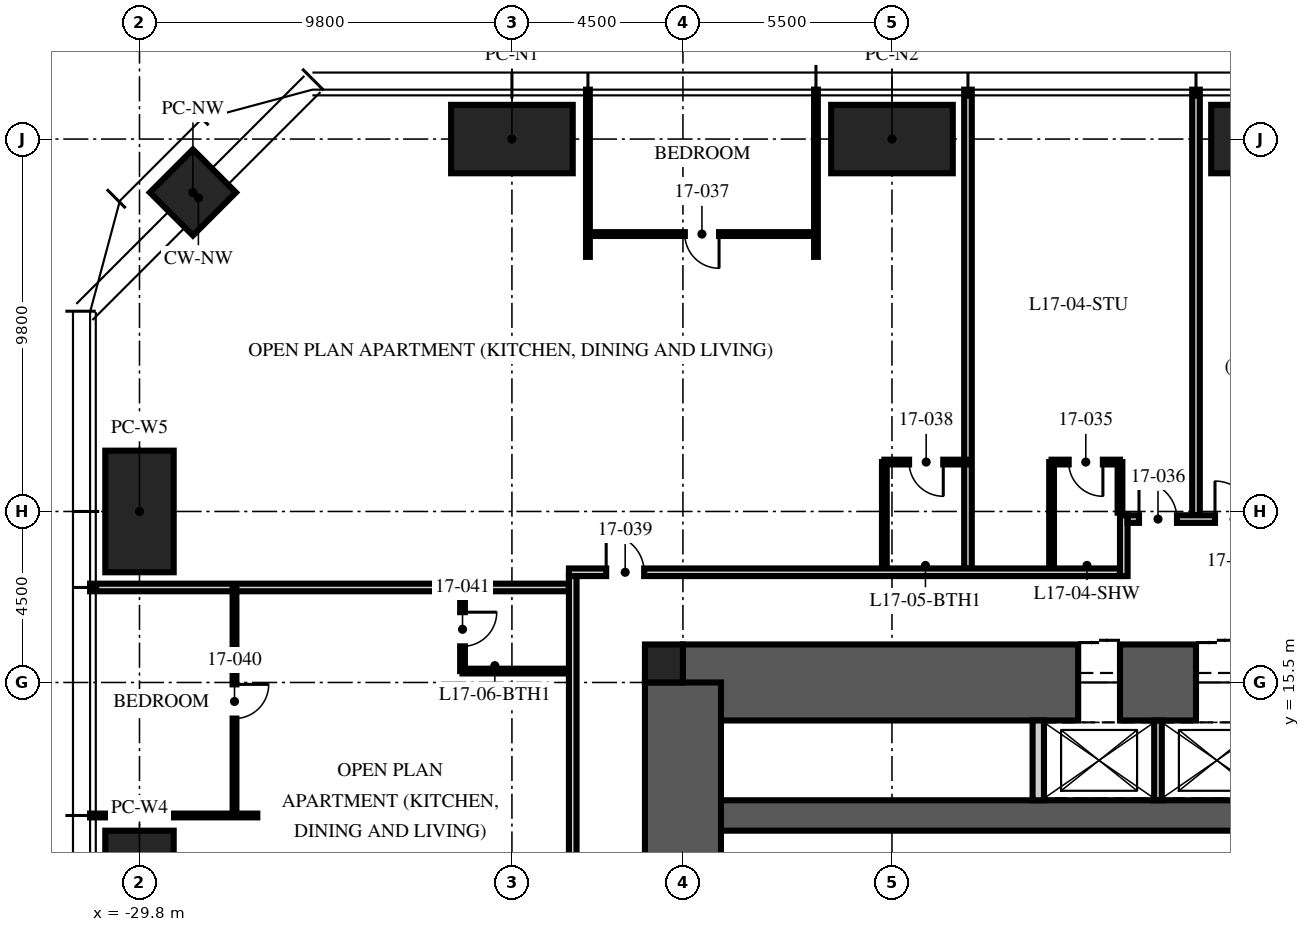
"""IFC4 building model, lengths in metres.
Left out: names, types, materials, properties, quantities, classifications, styles, units other than length and angle.
Written with IfcOpenShell. Run it as: python <this file> out.ifc"""

import sys

from ifc_helpers import new_model, si_unit, direction, frame, frame_2d, origin, origin_2d, place, context, subcontext, project, spatial, rectangle, hollow_rectangle, extrude, element, fill, save


model = new_model("IFC4")
c1 = context("Model", 3, precision=1e-05, world=origin(), true_north=direction((0.0, 1.0)))
c2 = subcontext(c1, "Body", "Model", "MODEL_VIEW")
j1 = project(units=[si_unit("LENGTHUNIT", "METRE"), si_unit("PLANEANGLEUNIT", "RADIAN")], contexts=[c1])
p1 = place(None, origin())
s1 = spatial("IfcSite", under=j1, at=p1, CompositionType="ELEMENT")
p2 = place(p1, origin())
s2 = spatial("IfcBuilding", under=s1, at=p2, CompositionType="ELEMENT")
p3 = place(p2, frame((0.0, 0.0, 69.75)))
s3 = spatial("IfcBuildingStorey", under=s2, at=p3, CompositionType="ELEMENT", Elevation=69.75)
p4 = place(p3, frame((-15.5, 15.5, -0.25), z_axis=(0.0, 0.0, 1.0), x_axis=(1.0, 0.0, 0.0)))
e1 = element("IfcWall", 1, at=p4, inside=s3, PredefinedType="SHEAR", context=c2, shape_type="SweptSolid", body=[
    extrude(rectangle(XDim=31.0, YDim=2.0, at=frame_2d((15.5, 0.0))), origin(), (0.0, 0.0, 1.0), 3.75),
])
p5 = place(p4, frame((10.4, 0.0, 0.25)))
e2 = element("IfcOpeningElement", 2, at=p5, cuts=e1, PredefinedType="OPENING", context=c2, shape_type="SweptSolid", body=[
    extrude(rectangle(XDim=1.1, YDim=2.1, at=frame_2d((0.55, 1.05))), frame((0.0, 1.01, 0.0), z_axis=(0.0, -1.0, 0.0), x_axis=(1.0, 0.0, 0.0)), (0.0, 0.0, 1.0), 2.02),
])
p6 = place(p4, frame((13.5, 0.0, 0.25)))
e3 = element("IfcOpeningElement", 3, at=p6, cuts=e1, PredefinedType="OPENING", context=c2, shape_type="SweptSolid", body=[
    extrude(rectangle(XDim=1.1, YDim=2.1, at=frame_2d((0.55, 1.05))), frame((0.0, 1.01, 0.0), z_axis=(0.0, -1.0, 0.0), x_axis=(1.0, 0.0, 0.0)), (0.0, 0.0, 1.0), 2.02),
])
p7 = place(p4, frame((16.6, 0.0, 0.25)))
e4 = element("IfcOpeningElement", 4, at=p7, cuts=e1, PredefinedType="OPENING", context=c2, shape_type="SweptSolid", body=[
    extrude(rectangle(XDim=1.1, YDim=2.1, at=frame_2d((0.55, 1.05))), frame((0.0, 1.01, 0.0), z_axis=(0.0, -1.0, 0.0), x_axis=(1.0, 0.0, 0.0)), (0.0, 0.0, 1.0), 2.02),
])
p8 = place(p3, frame((-15.5, 12.0, -0.25), z_axis=(0.0, 0.0, 1.0), x_axis=(1.0, 0.0, 0.0)))
e5 = element("IfcWall", 5, at=p8, inside=s3, PredefinedType="SHEAR", context=c2, shape_type="SweptSolid", body=[
    extrude(rectangle(XDim=31.0, YDim=0.8, at=frame_2d((15.5, 0.0))), origin(), (0.0, 0.0, 1.0), 3.75),
])
p9 = place(p3, frame((-15.5, -15.5, -0.25), z_axis=(0.0, 0.0, 1.0), x_axis=(0.0, 1.0, 0.0)))
e6 = element("IfcWall", 6, at=p9, inside=s3, PredefinedType="SHEAR", context=c2, shape_type="SweptSolid", body=[
    extrude(rectangle(XDim=31.0, YDim=2.0, at=frame_2d((15.5, 0.0))), origin(), (0.0, 0.0, 1.0), 3.75),
])
p10 = place(p9, frame((6.5, 0.0, 0.25)))
e7 = element("IfcOpeningElement", 7, at=p10, cuts=e6, PredefinedType="OPENING", context=c2, shape_type="SweptSolid", body=[
    extrude(rectangle(XDim=1.2, YDim=2.1, at=frame_2d((0.6, 1.05))), frame((0.0, 1.01, 0.0), z_axis=(0.0, -1.0, 0.0), x_axis=(1.0, 0.0, 0.0)), (0.0, 0.0, 1.0), 2.02),
])
p11 = place(p9, frame((23.0, 0.0, 0.25)))
e8 = element("IfcOpeningElement", 8, at=p11, cuts=e6, PredefinedType="OPENING", context=c2, shape_type="SweptSolid", body=[
    extrude(rectangle(XDim=1.8, YDim=2.1, at=frame_2d((0.9, 1.05))), frame((0.0, 1.01, 0.0), z_axis=(0.0, -1.0, 0.0), x_axis=(1.0, 0.0, 0.0)), (0.0, 0.0, 1.0), 2.02),
])
p12 = place(p3, frame((-16.0, 16.0, -0.25), z_axis=(0.0, 0.0, 1.0), x_axis=(1.0, 0.0, 0.0)))
e9 = element("IfcColumn", 9, at=p12, inside=s3, PredefinedType="COLUMN", context=c2, shape_type="SweptSolid", body=[
    extrude(rectangle(XDim=1.0, YDim=1.0, at=origin_2d()), origin(), (0.0, 0.0, 1.0), 3.75),
])
for number, where, z_axis, x_axis in (
    (10, (-20.0, 29.8, 0.0), (0.0, 0.0, 1.0), (1.0, 0.0, 0.0)),
    (11, (-10.0, 29.8, 0.0), (0.0, 0.0, 1.0), (1.0, 0.0, 0.0)),
    (12, (0.0, 29.8, 0.0), (0.0, 0.0, 1.0), (1.0, 0.0, 0.0)),
    (13, (-29.8, 10.0, 0.0), (0.0, 0.0, 1.0), (0.0, 1.0, 0.0)),
    (14, (-29.8, 20.0, 0.0), (0.0, 0.0, 1.0), (0.0, 1.0, 0.0)),
):
    element("IfcColumn", number, at=place(p3, frame(where, z_axis=z_axis, x_axis=x_axis)), inside=s3, PredefinedType="COLUMN", context=c2, shape_type="SweptSolid", body=[
        extrude(hollow_rectangle(XDim=3.2, YDim=1.8, WallThickness=0.2, at=origin_2d()), origin(), (0.0, 0.0, 1.0), 3.75),
    ])
p13 = place(p3, frame((-28.394, 28.394, 0.0), z_axis=(0.0, 0.0, 1.0), x_axis=(0.707106781187, 0.707106781187, 0.0)))
e15 = element("IfcColumn", 15, at=p13, inside=s3, PredefinedType="COLUMN", context=c2, shape_type="SweptSolid", body=[
    extrude(hollow_rectangle(XDim=1.6, YDim=1.6, WallThickness=0.1, at=origin_2d()), origin(), (0.0, 0.0, 1.0), 3.75),
])
p14 = place(p3, frame((-6.15, 12.4, 0.0), z_axis=(0.0, 0.0, 1.0), x_axis=(0.0, 1.0, 0.0)))
e16 = element("IfcWall", 16, at=p14, inside=s3, PredefinedType="PARTITIONING", context=c2, shape_type="SweptSolid", body=[
    extrude(rectangle(XDim=2.1, YDim=0.3, at=frame_2d((1.05, 0.0))), origin(), (0.0, 0.0, 1.0), 3.5),
])
p15 = place(p3, frame((-3.0, 12.4, 0.0), z_axis=(0.0, 0.0, 1.0), x_axis=(0.0, 1.0, 0.0)))
e17 = element("IfcWall", 17, at=p15, inside=s3, PredefinedType="PARTITIONING", context=c2, shape_type="SweptSolid", body=[
    extrude(rectangle(XDim=2.1, YDim=0.2, at=frame_2d((1.05, 0.0))), origin(), (0.0, 0.0, 1.0), 3.5),
])
p16 = place(p3, frame((-2.0, 19.9, 0.0), z_axis=(0.0, 0.0, 1.0), x_axis=(0.0, 1.0, 0.0)))
e18 = element("IfcWall", 18, at=p16, inside=s3, PredefinedType="PARTITIONING", context=c2, shape_type="SweptSolid", body=[
    extrude(rectangle(XDim=11.2, YDim=0.2, at=frame_2d((5.6, 0.0))), origin(), (0.0, 0.0, 1.0), 2.71),
])
p17 = place(p3, frame((-8.0, 18.5, 0.0), z_axis=(0.0, 0.0, 1.0), x_axis=(0.0, 1.0, 0.0)))
e19 = element("IfcWall", 19, at=p17, inside=s3, PredefinedType="PARTITIONING", context=c2, shape_type="SweptSolid", body=[
    extrude(rectangle(XDim=12.6, YDim=0.2, at=frame_2d((6.3, 0.0))), origin(), (0.0, 0.0, 1.0), 2.71),
])
for number, where, z_axis, x_axis in (
    (20, (-12.0, 26.7, 0.0), (0.0, 0.0, 1.0), (0.0, 1.0, 0.0)),
    (21, (-18.0, 26.7, 0.0), (0.0, 0.0, 1.0), (0.0, 1.0, 0.0)),
):
    element("IfcWall", number, at=place(p3, frame(where, z_axis=z_axis, x_axis=x_axis)), inside=s3, PredefinedType="PARTITIONING", context=c2, shape_type="SweptSolid", body=[
        extrude(rectangle(XDim=4.4, YDim=0.1, at=frame_2d((2.2, 0.0))), origin(), (0.0, 0.0, 1.0), 2.71),
    ])
p18 = place(p3, frame((-18.5, 18.0, 0.0), z_axis=(0.0, 0.0, 1.0), x_axis=(-1.0, 0.0, 0.0)))
e22 = element("IfcWall", 22, at=p18, inside=s3, PredefinedType="PARTITIONING", context=c2, shape_type="SweptSolid", body=[
    extrude(rectangle(XDim=12.6, YDim=0.2, at=frame_2d((6.3, 0.0))), origin(), (0.0, 0.0, 1.0), 2.3),
])
p19 = place(p3, frame((-26.7, 12.0, 0.0), z_axis=(0.0, 0.0, 1.0), x_axis=(-1.0, 0.0, 0.0)))
e23 = element("IfcWall", 23, at=p19, inside=s3, PredefinedType="PARTITIONING", context=c2, shape_type="SweptSolid", body=[
    extrude(rectangle(XDim=4.4, YDim=0.1, at=frame_2d((2.2, 0.0))), origin(), (0.0, 0.0, 1.0), 2.71),
])
p20 = place(p3, frame((-4.0, 21.3, 0.0), z_axis=(0.0, 0.0, 1.0), x_axis=(-1.0, 0.0, 0.0)))
e24 = element("IfcWall", 24, at=p20, inside=s3, PredefinedType="PARTITIONING", context=c2, shape_type="SweptSolid", body=[
    extrude(rectangle(XDim=1.8, YDim=0.125, at=frame_2d((0.9, 0.0))), origin(), (0.0, 0.0, 1.0), 2.61),
])
p21 = place(p20, frame((0.45, 0.0, 0.0)))
e25 = element("IfcOpeningElement", 25, at=p21, cuts=e24, PredefinedType="OPENING", context=c2, shape_type="SweptSolid", body=[
    extrude(rectangle(XDim=0.9, YDim=2.1, at=frame_2d((0.45, 1.05))), frame((0.0, 0.073, 0.0), z_axis=(0.0, -1.0, 0.0), x_axis=(1.0, 0.0, 0.0)), (0.0, 0.0, 1.0), 0.145),
])
p22 = place(p3, frame((-4.0, 19.97, 0.0), z_axis=(0.0, 0.0, 1.0), x_axis=(0.0, 1.0, 0.0)))
e26 = element("IfcWall", 26, at=p22, inside=s3, PredefinedType="PARTITIONING", context=c2, shape_type="SweptSolid", body=[
    extrude(rectangle(XDim=1.33, YDim=0.125, at=frame_2d((0.665, 0.0))), origin(), (0.0, 0.0, 1.0), 3.5),
])
p23 = place(p3, frame((-5.8, 18.5, 0.0), z_axis=(0.0, 0.0, 1.0), x_axis=(0.0, 1.0, 0.0)))
e27 = element("IfcWall", 27, at=p23, inside=s3, PredefinedType="PARTITIONING", context=c2, shape_type="SweptSolid", body=[
    extrude(rectangle(XDim=2.8, YDim=0.125, at=frame_2d((1.4, 0.0))), origin(), (0.0, 0.0, 1.0), 3.5),
])
p24 = place(p3, frame((-12.0, 27.3, 0.0), z_axis=(0.0, 0.0, 1.0), x_axis=(-1.0, 0.0, 0.0)))
e28 = element("IfcWall", 28, at=p24, inside=s3, PredefinedType="PARTITIONING", context=c2, shape_type="SweptSolid", body=[
    extrude(rectangle(XDim=6.0, YDim=0.1, at=frame_2d((3.0, 0.0))), origin(), (0.0, 0.0, 1.0), 2.61),
])
p25 = place(p24, frame((2.55, 0.0, 0.0)))
e29 = element("IfcOpeningElement", 29, at=p25, cuts=e28, PredefinedType="OPENING", context=c2, shape_type="SweptSolid", body=[
    extrude(rectangle(XDim=0.9, YDim=2.1, at=frame_2d((0.45, 1.05))), frame((0.0, 0.06, 0.0), z_axis=(0.0, -1.0, 0.0), x_axis=(1.0, 0.0, 0.0)), (0.0, 0.0, 1.0), 0.12),
])
p26 = place(p3, frame((-8.0, 21.3, 0.0), z_axis=(0.0, 0.0, 1.0), x_axis=(-1.0, 0.0, 0.0)))
e30 = element("IfcWall", 30, at=p26, inside=s3, PredefinedType="PARTITIONING", context=c2, shape_type="SweptSolid", body=[
    extrude(rectangle(XDim=2.2, YDim=0.125, at=frame_2d((1.1, 0.0))), origin(), (0.0, 0.0, 1.0), 2.492),
])
p27 = place(p26, frame((0.65, 0.0, 0.0)))
e31 = element("IfcOpeningElement", 31, at=p27, cuts=e30, PredefinedType="OPENING", context=c2, shape_type="SweptSolid", body=[
    extrude(rectangle(XDim=0.9, YDim=2.1, at=frame_2d((0.45, 1.05))), frame((0.0, 0.073, 0.0), z_axis=(0.0, -1.0, 0.0), x_axis=(1.0, 0.0, 0.0)), (0.0, 0.0, 1.0), 0.145),
])
p28 = place(p3, frame((-10.2, 18.5, 0.0), z_axis=(0.0, 0.0, 1.0), x_axis=(0.0, 1.0, 0.0)))
e32 = element("IfcWall", 32, at=p28, inside=s3, PredefinedType="PARTITIONING", context=c2, shape_type="SweptSolid", body=[
    extrude(rectangle(XDim=2.8, YDim=0.125, at=frame_2d((1.4, 0.0))), origin(), (0.0, 0.0, 1.0), 2.492),
])
p29 = place(p3, frame((-27.3, 18.0, 0.0), z_axis=(0.0, 0.0, 1.0), x_axis=(0.0, -1.0, 0.0)))
e33 = element("IfcWall", 33, at=p29, inside=s3, PredefinedType="PARTITIONING", context=c2, shape_type="SweptSolid", body=[
    extrude(rectangle(XDim=6.0, YDim=0.1, at=frame_2d((3.0, 0.0))), origin(), (0.0, 0.0, 1.0), 2.61),
])
p30 = place(p29, frame((2.55, 0.0, 0.0)))
e34 = element("IfcOpeningElement", 34, at=p30, cuts=e33, PredefinedType="OPENING", context=c2, shape_type="SweptSolid", body=[
    extrude(rectangle(XDim=0.9, YDim=2.1, at=frame_2d((0.45, 1.05))), frame((0.0, 0.06, 0.0), z_axis=(0.0, -1.0, 0.0), x_axis=(1.0, 0.0, 0.0)), (0.0, 0.0, 1.0), 0.12),
])
p31 = place(p3, frame((-21.3, 18.0, 0.0), z_axis=(0.0, 0.0, 1.0), x_axis=(0.0, -1.0, 0.0)))
e35 = element("IfcWall", 35, at=p31, inside=s3, PredefinedType="PARTITIONING", context=c2, shape_type="SweptSolid", body=[
    extrude(rectangle(XDim=2.2, YDim=0.125, at=frame_2d((1.1, 0.0))), origin(), (0.0, 0.0, 1.0), 3.5),
])
p32 = place(p31, frame((0.65, 0.0, 0.0)))
e36 = element("IfcOpeningElement", 36, at=p32, cuts=e35, PredefinedType="OPENING", context=c2, shape_type="SweptSolid", body=[
    extrude(rectangle(XDim=0.9, YDim=2.1, at=frame_2d((0.45, 1.05))), frame((0.0, 0.073, 0.0), z_axis=(0.0, -1.0, 0.0), x_axis=(1.0, 0.0, 0.0)), (0.0, 0.0, 1.0), 0.145),
])
p33 = place(p3, frame((-18.5, 15.8, 0.0), z_axis=(0.0, 0.0, 1.0), x_axis=(-1.0, 0.0, 0.0)))
e37 = element("IfcWall", 37, at=p33, inside=s3, PredefinedType="PARTITIONING", context=c2, shape_type="SweptSolid", body=[
    extrude(rectangle(XDim=2.8, YDim=0.125, at=frame_2d((1.4, 0.0))), origin(), (0.0, 0.0, 1.0), 3.5),
])
p34 = place(p3, frame((-18.5, 18.4, 0.0), z_axis=(0.0, 0.0, 1.0), x_axis=(1.0, 0.0, 0.0)))
e38 = element("IfcWall", 38, at=p34, inside=s3, PredefinedType="PARTITIONING", context=c2, shape_type="SweptSolid", body=[
    extrude(rectangle(XDim=14.5, YDim=0.2, at=frame_2d((7.25, 0.0))), origin(), (0.0, 0.0, 1.0), 2.3),
])
p35 = place(p34, frame((0.98, 0.0, 0.0)))
e39 = element("IfcOpeningElement", 39, at=p35, cuts=e38, PredefinedType="OPENING", context=c2, shape_type="SweptSolid", body=[
    extrude(rectangle(XDim=1.0, YDim=2.2, at=frame_2d((0.5, 1.1))), frame((0.0, 0.11, 0.0), z_axis=(0.0, -1.0, 0.0), x_axis=(1.0, 0.0, 0.0)), (0.0, 0.0, 1.0), 0.22),
])
p36 = place(p3, frame((-3.9, 18.3, 0.0), z_axis=(0.0, 0.0, 1.0), x_axis=(0.0, 1.0, 0.0)))
e40 = element("IfcWall", 40, at=p36, inside=s3, PredefinedType="PARTITIONING", context=c2, shape_type="SweptSolid", body=[
    extrude(rectangle(XDim=1.6, YDim=0.2, at=frame_2d((0.8, 0.0))), origin(), (0.0, 0.0, 1.0), 3.5),
])
p37 = place(p3, frame((-3.8, 19.8, 0.0), z_axis=(0.0, 0.0, 1.0), x_axis=(1.0, 0.0, 0.0)))
e41 = element("IfcWall", 41, at=p37, inside=s3, PredefinedType="PARTITIONING", context=c2, shape_type="SweptSolid", body=[
    extrude(rectangle(XDim=3.6, YDim=0.2, at=frame_2d((1.8, 0.0))), origin(), (0.0, 0.0, 1.0), 3.5),
])
p38 = place(p37, frame((2.3, 0.0, 0.0)))
e42 = element("IfcOpeningElement", 42, at=p38, cuts=e41, PredefinedType="OPENING", context=c2, shape_type="SweptSolid", body=[
    extrude(rectangle(XDim=1.0, YDim=2.2, at=frame_2d((0.5, 1.1))), frame((0.0, 0.11, 0.0), z_axis=(0.0, -1.0, 0.0), x_axis=(1.0, 0.0, 0.0)), (0.0, 0.0, 1.0), 0.22),
])
p39 = place(p37, frame((0.3, 0.0, 0.0)))
e43 = element("IfcOpeningElement", 43, at=p39, cuts=e41, PredefinedType="OPENING", context=c2, shape_type="SweptSolid", body=[
    extrude(rectangle(XDim=1.0, YDim=2.2, at=frame_2d((0.5, 1.1))), frame((0.0, 0.11, 0.0), z_axis=(0.0, -1.0, 0.0), x_axis=(1.0, 0.0, 0.0)), (0.0, 0.0, 1.0), 0.22),
])
p40 = place(p3, frame((-18.4, 18.3, 0.0), z_axis=(0.0, 0.0, 1.0), x_axis=(0.0, -1.0, 0.0)))
e44 = element("IfcWall", 44, at=p40, inside=s3, PredefinedType="PARTITIONING", context=c2, shape_type="SweptSolid", body=[
    extrude(rectangle(XDim=36.6, YDim=0.2, at=frame_2d((18.3, 0.0))), origin(), (0.0, 0.0, 1.0), 2.3),
])
p41 = place(p40, frame((8.57, 0.0, 0.0)))
e45 = element("IfcOpeningElement", 45, at=p41, cuts=e44, PredefinedType="OPENING", context=c2, shape_type="SweptSolid", body=[
    extrude(rectangle(XDim=1.0, YDim=2.2, at=frame_2d((0.5, 1.1))), frame((0.0, 0.11, 0.0), z_axis=(0.0, -1.0, 0.0), x_axis=(1.0, 0.0, 0.0)), (0.0, 0.0, 1.0), 0.22),
])
p42 = place(p40, frame((14.87, 0.0, 0.0)))
e46 = element("IfcOpeningElement", 46, at=p42, cuts=e44, PredefinedType="OPENING", context=c2, shape_type="SweptSolid", body=[
    extrude(rectangle(XDim=1.0, YDim=2.2, at=frame_2d((0.5, 1.1))), frame((0.0, 0.11, 0.0), z_axis=(0.0, -1.0, 0.0), x_axis=(1.0, 0.0, 0.0)), (0.0, 0.0, 1.0), 0.22),
])
p43 = place(p40, frame((18.87, 0.0, 0.0)))
e47 = element("IfcOpeningElement", 47, at=p43, cuts=e44, PredefinedType="OPENING", context=c2, shape_type="SweptSolid", body=[
    extrude(rectangle(XDim=1.0, YDim=2.2, at=frame_2d((0.5, 1.1))), frame((0.0, 0.11, 0.0), z_axis=(0.0, -1.0, 0.0), x_axis=(1.0, 0.0, 0.0)), (0.0, 0.0, 1.0), 0.22),
])
p44 = place(p40, frame((34.82, 0.0, 0.0)))
e48 = element("IfcOpeningElement", 48, at=p44, cuts=e44, PredefinedType="OPENING", context=c2, shape_type="SweptSolid", body=[
    extrude(rectangle(XDim=1.0, YDim=2.2, at=frame_2d((0.5, 1.1))), frame((0.0, 0.11, 0.0), z_axis=(0.0, -1.0, 0.0), x_axis=(1.0, 0.0, 0.0)), (0.0, 0.0, 1.0), 0.22),
])
p45 = place(p5, origin())
e49 = element("IfcDoor", 49, at=p45, inside=s3, OperationType="DOUBLE_DOOR_SLIDING", PredefinedType="DOOR", context=c2, shape_type="SweptSolid", body=[
    extrude(rectangle(XDim=1.1, YDim=2.1, at=frame_2d((0.55, 1.05))), frame((0.0, 0.025, 0.0), z_axis=(0.0, -1.0, 0.0), x_axis=(1.0, 0.0, 0.0)), (0.0, 0.0, 1.0), 0.05),
])
fill(e2, e49)
p46 = place(p6, origin())
e50 = element("IfcDoor", 50, at=p46, inside=s3, OperationType="DOUBLE_DOOR_SLIDING", PredefinedType="DOOR", context=c2, shape_type="SweptSolid", body=[
    extrude(rectangle(XDim=1.1, YDim=2.1, at=frame_2d((0.55, 1.05))), frame((0.0, 0.025, 0.0), z_axis=(0.0, -1.0, 0.0), x_axis=(1.0, 0.0, 0.0)), (0.0, 0.0, 1.0), 0.05),
])
fill(e3, e50)
p47 = place(p38, origin())
e51 = element("IfcDoor", 51, at=p47, inside=s3, OperationType="SINGLE_SWING_LEFT", PredefinedType="DOOR", context=c2, shape_type="SweptSolid", body=[
    extrude(rectangle(XDim=1.0, YDim=2.2, at=frame_2d((0.5, 1.1))), frame((0.0, 0.025, 0.0), z_axis=(0.0, -1.0, 0.0), x_axis=(1.0, 0.0, 0.0)), (0.0, 0.0, 1.0), 0.05),
])
fill(e42, e51)
p48 = place(p21, origin())
e52 = element("IfcDoor", 52, at=p48, inside=s3, OperationType="SINGLE_SWING_LEFT", PredefinedType="DOOR", context=c2, shape_type="SweptSolid", body=[
    extrude(rectangle(XDim=0.9, YDim=2.1, at=frame_2d((0.45, 1.05))), frame((0.0, 0.025, 0.0), z_axis=(0.0, -1.0, 0.0), x_axis=(1.0, 0.0, 0.0)), (0.0, 0.0, 1.0), 0.05),
])
fill(e25, e52)
p49 = place(p39, origin())
e53 = element("IfcDoor", 53, at=p49, inside=s3, OperationType="SINGLE_SWING_LEFT", PredefinedType="DOOR", context=c2, shape_type="SweptSolid", body=[
    extrude(rectangle(XDim=1.0, YDim=2.2, at=frame_2d((0.5, 1.1))), frame((0.0, 0.025, 0.0), z_axis=(0.0, -1.0, 0.0), x_axis=(1.0, 0.0, 0.0)), (0.0, 0.0, 1.0), 0.05),
])
fill(e43, e53)
p50 = place(p25, origin())
e54 = element("IfcDoor", 54, at=p50, inside=s3, OperationType="SINGLE_SWING_LEFT", PredefinedType="DOOR", context=c2, shape_type="SweptSolid", body=[
    extrude(rectangle(XDim=0.9, YDim=2.1, at=frame_2d((0.45, 1.05))), frame((0.0, 0.025, 0.0), z_axis=(0.0, -1.0, 0.0), x_axis=(1.0, 0.0, 0.0)), (0.0, 0.0, 1.0), 0.05),
])
fill(e29, e54)
p51 = place(p27, origin())
e55 = element("IfcDoor", 55, at=p51, inside=s3, OperationType="SINGLE_SWING_LEFT", PredefinedType="DOOR", context=c2, shape_type="SweptSolid", body=[
    extrude(rectangle(XDim=0.9, YDim=2.1, at=frame_2d((0.45, 1.05))), frame((0.0, 0.025, 0.0), z_axis=(0.0, -1.0, 0.0), x_axis=(1.0, 0.0, 0.0)), (0.0, 0.0, 1.0), 0.05),
])
fill(e31, e55)
p52 = place(p35, origin())
e56 = element("IfcDoor", 56, at=p52, inside=s3, OperationType="SINGLE_SWING_LEFT", PredefinedType="DOOR", context=c2, shape_type="SweptSolid", body=[
    extrude(rectangle(XDim=1.0, YDim=2.2, at=frame_2d((0.5, 1.1))), frame((0.0, 0.025, 0.0), z_axis=(0.0, -1.0, 0.0), x_axis=(1.0, 0.0, 0.0)), (0.0, 0.0, 1.0), 0.05),
])
fill(e39, e56)
p53 = place(p30, origin())
e57 = element("IfcDoor", 57, at=p53, inside=s3, OperationType="SINGLE_SWING_LEFT", PredefinedType="DOOR", context=c2, shape_type="SweptSolid", body=[
    extrude(rectangle(XDim=0.9, YDim=2.1, at=frame_2d((0.45, 1.05))), frame((0.0, 0.025, 0.0), z_axis=(0.0, -1.0, 0.0), x_axis=(1.0, 0.0, 0.0)), (0.0, 0.0, 1.0), 0.05),
])
fill(e34, e57)
p54 = place(p32, origin())
e58 = element("IfcDoor", 58, at=p54, inside=s3, OperationType="SINGLE_SWING_LEFT", PredefinedType="DOOR", context=c2, shape_type="SweptSolid", body=[
    extrude(rectangle(XDim=0.9, YDim=2.1, at=frame_2d((0.45, 1.05))), frame((0.0, 0.025, 0.0), z_axis=(0.0, -1.0, 0.0), x_axis=(1.0, 0.0, 0.0)), (0.0, 0.0, 1.0), 0.05),
])
fill(e36, e58)
save(model, sys.argv[1])
